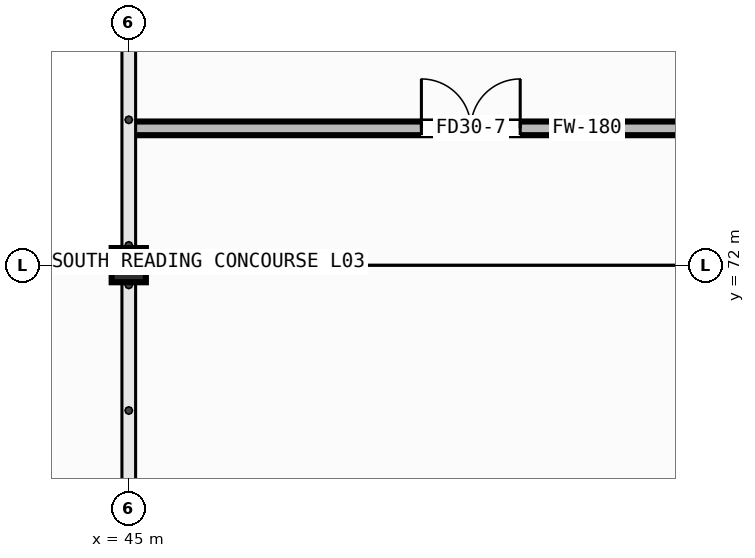
"""IFC4 building model, lengths in metres.
Left out: names, types, materials, properties, quantities, classifications, styles, units other than length and angle.
Written with IfcOpenShell. Run it as: python <this file> out.ifc"""

import sys

from ifc_helpers import new_model, si_unit, direction, frame, frame_2d, origin, origin_2d, place, context, subcontext, project, spatial, rectangle, hollow_rectangle, extrude, element, fill, save


model = new_model("IFC4")
c1 = context("Model", 3, precision=1e-05, world=origin(), true_north=direction((0.0, 1.0)))
c2 = subcontext(c1, "Body", "Model", "MODEL_VIEW")
j1 = project(units=[si_unit("LENGTHUNIT", "METRE"), si_unit("PLANEANGLEUNIT", "RADIAN")], contexts=[c1])
p1 = place(None, origin())
s1 = spatial("IfcSite", under=j1, at=p1, CompositionType="ELEMENT")
p2 = place(p1, origin())
s2 = spatial("IfcBuilding", under=s1, at=p2, CompositionType="ELEMENT")
p3 = place(p2, frame((0.0, 0.0, 8.8)))
s3 = spatial("IfcBuildingStorey", under=s2, at=p3, CompositionType="ELEMENT", Elevation=8.8)
p4 = place(p3, frame((45.0, 72.0, 0.0), z_axis=(0.0, 0.0, 1.0), x_axis=(1.0, 0.0, 0.0)))
e1 = element("IfcColumn", 1, at=p4, inside=s3, PredefinedType="COLUMN", context=c2, shape_type="SweptSolid", body=[
    extrude(hollow_rectangle(XDim=0.45, YDim=0.45, WallThickness=0.019, at=origin_2d()), origin(), (0.0, 0.0, 1.0), 4.0),
])
p5 = place(p3, frame((45.035, 73.8, 0.0), z_axis=(0.0, 0.0, 1.0), x_axis=(1.0, 0.0, 0.0)))
e2 = element("IfcWall", 2, at=p5, inside=s3, PredefinedType="PARTITIONING", context=c2, shape_type="SweptSolid", body=[
    extrude(rectangle(XDim=9.365, YDim=0.18, at=frame_2d((4.683, 0.0))), origin(), (0.0, 0.0, 1.0), 3.745),
])
p6 = place(p5, frame((3.815, 0.0, 0.0)))
e3 = element("IfcOpeningElement", 3, at=p6, cuts=e2, PredefinedType="OPENING", context=c2, shape_type="SweptSolid", body=[
    extrude(rectangle(XDim=1.3, YDim=2.08, at=frame_2d((0.65, 1.04))), frame((0.0, 0.102, 0.0), z_axis=(0.0, -1.0, 0.0), x_axis=(1.0, 0.0, 0.0)), (0.0, 0.0, 1.0), 0.204),
])
p7 = place(p6, origin())
e4 = element("IfcDoor", 4, at=p7, inside=s3, OperationType="DOUBLE_DOOR_SINGLE_SWING", PredefinedType="DOOR", context=c2, shape_type="SweptSolid", body=[
    extrude(rectangle(XDim=1.3, YDim=2.08, at=frame_2d((0.65, 1.04))), frame((0.0, 0.025, 0.0), z_axis=(0.0, -1.0, 0.0), x_axis=(1.0, 0.0, 0.0)), (0.0, 0.0, 1.0), 0.05),
])
fill(e3, e4)
save(model, sys.argv[1])
